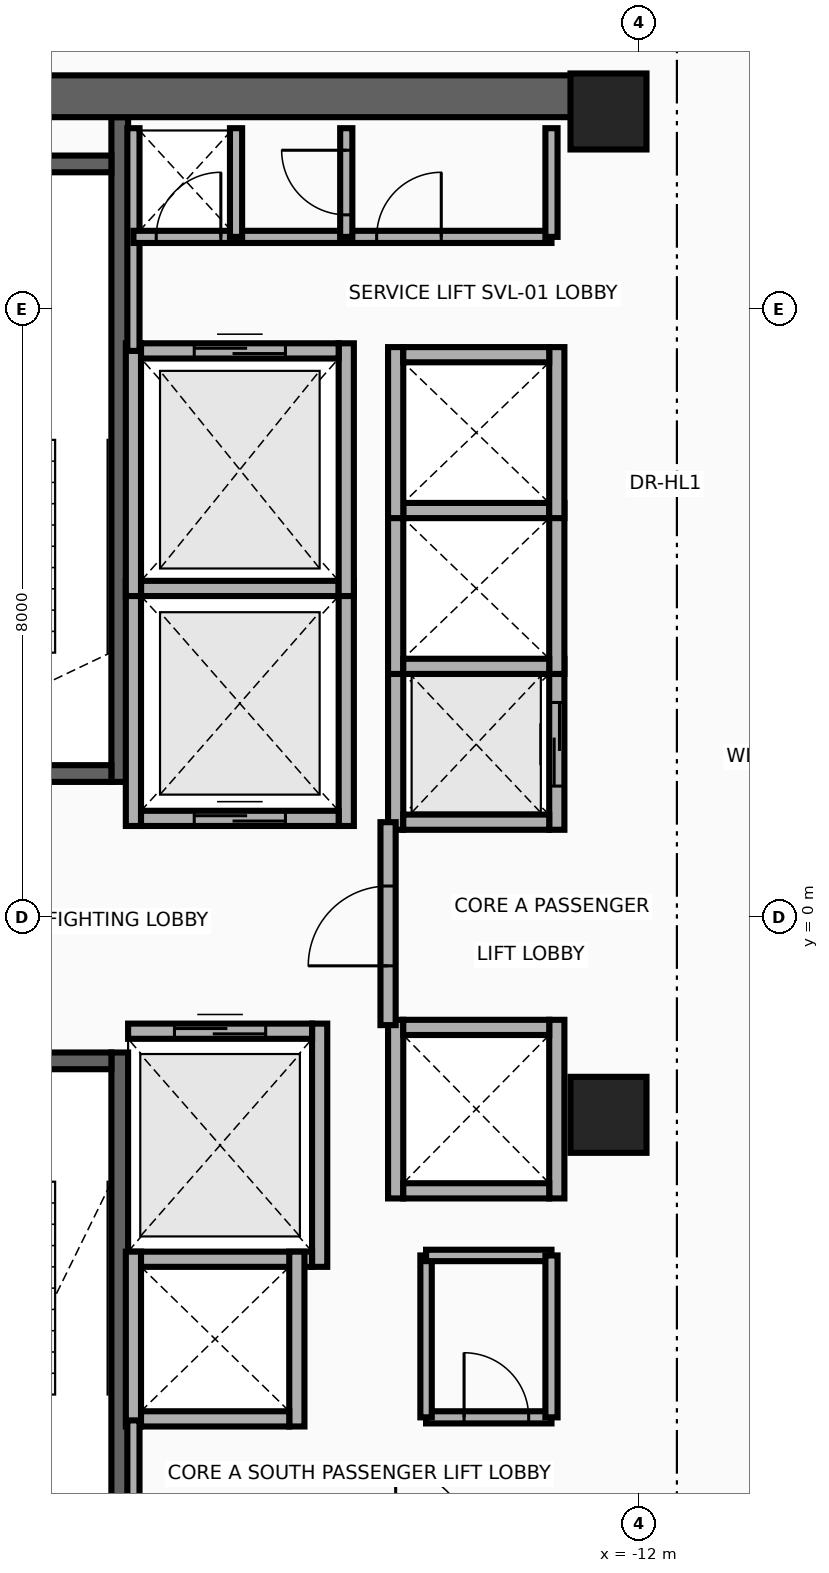
"""IFC4 building model, lengths in metres.
Left out: names, types, materials, properties, quantities, classifications, styles, units other than length and angle.
Written with IfcOpenShell. Run it as: python <this file> out.ifc"""

import sys

from ifc_helpers import new_model, si_unit, direction, frame, frame_2d, origin, origin_2d, place, context, subcontext, project, spatial, rectangle, extrude, source, transform, mapped, element, fill, save


model = new_model("IFC4")
c1 = context("Model", 3, precision=1e-05, world=origin(), true_north=direction((0.0, 1.0)))
c2 = subcontext(c1, "Body", "Model", "MODEL_VIEW")
j1 = project(units=[si_unit("LENGTHUNIT", "METRE"), si_unit("PLANEANGLEUNIT", "RADIAN")], contexts=[c1])
p1 = place(None, origin())
s1 = spatial("IfcSite", under=j1, at=p1, CompositionType="ELEMENT")
p2 = place(p1, origin())
s2 = spatial("IfcBuilding", under=s1, at=p2, CompositionType="ELEMENT")
p3 = place(p2, frame((0.0, 0.0, 180.5)))
s3 = spatial("IfcBuildingStorey", under=s2, at=p3, CompositionType="ELEMENT", Elevation=180.5)
p4 = place(p3, frame((-18.83, 1.78, 0.0), z_axis=(0.0, 0.0, 1.0), x_axis=(0.0, 1.0, 0.0)))
e1 = element("IfcWall", 1, at=p4, inside=s3, PredefinedType="SHEAR", context=c2, shape_type="SweptSolid", body=[
    extrude(rectangle(XDim=8.745, YDim=0.22, at=frame_2d((4.373, 0.0))), origin(), (0.0, 0.0, 1.0), 3.63),
])
p5 = place(p3, frame((-22.05, 1.89, 0.0), z_axis=(0.0, 0.0, 1.0), x_axis=(1.0, 0.0, 0.0)))
e2 = element("IfcWall", 2, at=p5, inside=s3, PredefinedType="SHEAR", context=c2, shape_type="SweptSolid", body=[
    extrude(rectangle(XDim=3.11, YDim=0.22, at=frame_2d((1.555, 0.0))), origin(), (0.0, 0.0, 1.0), 3.63),
])
p6 = place(p5, frame((1.0, 0.0, 0.0)))
e3 = element("IfcOpeningElement", 3, at=p6, cuts=e2, PredefinedType="OPENING", context=c2, shape_type="SweptSolid", body=[
    extrude(rectangle(XDim=1.1, YDim=2.15, at=frame_2d((0.55, 1.075))), frame((0.0, 0.125, 0.0), z_axis=(0.0, -1.0, 0.0), x_axis=(1.0, 0.0, 0.0)), (0.0, 0.0, 1.0), 0.25),
])
p7 = place(p3, frame((-22.05, 9.91, 0.0), z_axis=(0.0, 0.0, 1.0), x_axis=(1.0, 0.0, 0.0)))
e4 = element("IfcWall", 4, at=p7, inside=s3, PredefinedType="SHEAR", context=c2, shape_type="SweptSolid", body=[
    extrude(rectangle(XDim=3.11, YDim=0.22, at=frame_2d((1.555, 0.0))), origin(), (0.0, 0.0, 1.0), 3.63),
])
p8 = place(p3, frame((-18.83, -10.525, 0.0), z_axis=(0.0, 0.0, 1.0), x_axis=(0.0, 1.0, 0.0)))
e5 = element("IfcWall", 5, at=p8, inside=s3, PredefinedType="SHEAR", context=c2, shape_type="SweptSolid", body=[
    extrude(rectangle(XDim=8.745, YDim=0.22, at=frame_2d((4.373, 0.0))), origin(), (0.0, 0.0, 1.0), 3.63),
])
p9 = place(p3, frame((-22.05, -1.89, 0.0), z_axis=(0.0, 0.0, 1.0), x_axis=(1.0, 0.0, 0.0)))
e6 = element("IfcWall", 6, at=p9, inside=s3, PredefinedType="SHEAR", context=c2, shape_type="SweptSolid", body=[
    extrude(rectangle(XDim=3.11, YDim=0.22, at=frame_2d((1.555, 0.0))), origin(), (0.0, 0.0, 1.0), 3.63),
])
p10 = place(p9, frame((1.0, 0.0, 0.0)))
e7 = element("IfcOpeningElement", 7, at=p10, cuts=e6, PredefinedType="OPENING", context=c2, shape_type="SweptSolid", body=[
    extrude(rectangle(XDim=1.1, YDim=2.15, at=frame_2d((0.55, 1.075))), frame((0.0, 0.125, 0.0), z_axis=(0.0, -1.0, 0.0), x_axis=(1.0, 0.0, 0.0)), (0.0, 0.0, 1.0), 0.25),
])
p11 = place(p3, frame((-22.65, 10.8, 0.0), z_axis=(0.0, 0.0, 1.0), x_axis=(1.0, 0.0, 0.0)))
e8 = element("IfcWall", 8, at=p11, inside=s3, PredefinedType="SHEAR", context=c2, shape_type="SweptSolid", body=[
    extrude(rectangle(XDim=10.25, YDim=0.55, at=frame_2d((5.125, 0.0))), origin(), (0.0, 0.0, 1.0), 3.63),
])
m1 = source(origin(), c2, "Body", "SweptSolid", [
    extrude(rectangle(XDim=1.0, YDim=1.0, at=origin_2d()), origin(), (0.0, 0.0, 1.0), 3.95),
])
for number, where, z_axis, x_axis in (
    (9, (-12.4, -2.6, 0.0), (0.0, 0.0, 1.0), (1.0, 0.0, 0.0)),
    (10, (-12.4, 10.6, 0.0), (0.0, 0.0, 1.0), (1.0, 0.0, 0.0)),
):
    element("IfcColumn", number, at=place(p3, frame(where, z_axis=z_axis, x_axis=x_axis)), inside=s3, PredefinedType="COLUMN", context=c2, shape_type="MappedRepresentation", body=[
        mapped(m1, transform((0.0, 0.0, 0.0), x_axis=(1.0, 0.0, 0.0), y_axis=(0.0, 1.0, 0.0), z_axis=(0.0, 0.0, 1.0), scale=1.0)),
    ])
for number, where, z_axis, x_axis in (
    (11, (-18.65, 1.2, 0.0), (0.0, 0.0, 1.0), (0.0, 1.0, 0.0)),
    (12, (-15.85, 1.2, 0.0), (0.0, 0.0, 1.0), (0.0, 1.0, 0.0)),
):
    element("IfcWall", number, at=place(p3, frame(where, z_axis=z_axis, x_axis=x_axis)), inside=s3, PredefinedType="MOVABLE", context=c2, shape_type="SweptSolid", body=[
        extrude(rectangle(XDim=3.225, YDim=0.2, at=frame_2d((1.613, 0.0))), origin(), (0.0, 0.0, 1.0), 3.63),
    ])
p12 = place(p3, frame((-18.55, 1.3, 0.0), z_axis=(0.0, 0.0, 1.0), x_axis=(1.0, 0.0, 0.0)))
e13 = element("IfcWall", 13, at=p12, inside=s3, PredefinedType="MOVABLE", context=c2, shape_type="SweptSolid", body=[
    extrude(rectangle(XDim=2.6, YDim=0.2, at=frame_2d((1.3, 0.0))), origin(), (0.0, 0.0, 1.0), 3.63),
])
p13 = place(p12, frame((0.7, 0.0, 0.0)))
e14 = element("IfcOpeningElement", 14, at=p13, cuts=e13, PredefinedType="OPENING", context=c2, shape_type="SweptSolid", body=[
    extrude(rectangle(XDim=1.2, YDim=2.1, at=frame_2d((0.6, 1.05))), frame((0.0, 0.115, 0.0), z_axis=(0.0, -1.0, 0.0), x_axis=(1.0, 0.0, 0.0)), (0.0, 0.0, 1.0), 0.23),
])
p14 = place(p3, frame((-18.55, 4.325, 0.0), z_axis=(0.0, 0.0, 1.0), x_axis=(1.0, 0.0, 0.0)))
e15 = element("IfcWall", 15, at=p14, inside=s3, PredefinedType="MOVABLE", context=c2, shape_type="SweptSolid", body=[
    extrude(rectangle(XDim=2.6, YDim=0.2, at=frame_2d((1.3, 0.0))), origin(), (0.0, 0.0, 1.0), 3.63),
])
p15 = place(p3, frame((-16.2, -4.6, 0.0), z_axis=(0.0, 0.0, 1.0), x_axis=(0.0, 1.0, 0.0)))
e16 = element("IfcWall", 16, at=p15, inside=s3, PredefinedType="MOVABLE", context=c2, shape_type="SweptSolid", body=[
    extrude(rectangle(XDim=3.2, YDim=0.2, at=frame_2d((1.6, 0.0))), origin(), (0.0, 0.0, 1.0), 3.63),
])
p16 = place(p3, frame((-18.72, -4.5, 0.0), z_axis=(0.0, 0.0, 1.0), x_axis=(1.0, 0.0, 0.0)))
e17 = element("IfcWall", 17, at=p16, inside=s3, PredefinedType="MOVABLE", context=c2, shape_type="SweptSolid", body=[
    extrude(rectangle(XDim=2.42, YDim=0.2, at=frame_2d((1.21, 0.0))), origin(), (0.0, 0.0, 1.0), 3.63),
])
p17 = place(p3, frame((-18.72, -1.5, 0.0), z_axis=(0.0, 0.0, 1.0), x_axis=(1.0, 0.0, 0.0)))
e18 = element("IfcWall", 18, at=p17, inside=s3, PredefinedType="MOVABLE", context=c2, shape_type="SweptSolid", body=[
    extrude(rectangle(XDim=2.42, YDim=0.2, at=frame_2d((1.21, 0.0))), origin(), (0.0, 0.0, 1.0), 3.63),
])
p18 = place(p17, frame((0.61, 0.0, 0.0)))
e19 = element("IfcOpeningElement", 19, at=p18, cuts=e18, PredefinedType="OPENING", context=c2, shape_type="SweptSolid", body=[
    extrude(rectangle(XDim=1.2, YDim=2.1, at=frame_2d((0.6, 1.05))), frame((0.0, 0.115, 0.0), z_axis=(0.0, -1.0, 0.0), x_axis=(1.0, 0.0, 0.0)), (0.0, 0.0, 1.0), 0.23),
])
for number, where, z_axis, x_axis in (
    (20, (-18.65, 4.225, 0.0), (0.0, 0.0, 1.0), (0.0, 1.0, 0.0)),
    (21, (-15.85, 4.225, 0.0), (0.0, 0.0, 1.0), (0.0, 1.0, 0.0)),
):
    element("IfcWall", number, at=place(p3, frame(where, z_axis=z_axis, x_axis=x_axis)), inside=s3, PredefinedType="MOVABLE", context=c2, shape_type="SweptSolid", body=[
        extrude(rectangle(XDim=3.325, YDim=0.2, at=frame_2d((1.663, 0.0))), origin(), (0.0, 0.0, 1.0), 3.63),
    ])
p19 = place(p3, frame((-18.55, 7.45, 0.0), z_axis=(0.0, 0.0, 1.0), x_axis=(1.0, 0.0, 0.0)))
e22 = element("IfcWall", 22, at=p19, inside=s3, PredefinedType="MOVABLE", context=c2, shape_type="SweptSolid", body=[
    extrude(rectangle(XDim=2.6, YDim=0.2, at=frame_2d((1.3, 0.0))), origin(), (0.0, 0.0, 1.0), 3.63),
])
p20 = place(p19, frame((0.7, 0.0, 0.0)))
e23 = element("IfcOpeningElement", 23, at=p20, cuts=e22, PredefinedType="OPENING", context=c2, shape_type="SweptSolid", body=[
    extrude(rectangle(XDim=1.2, YDim=2.1, at=frame_2d((0.6, 1.05))), frame((0.0, 0.115, 0.0), z_axis=(0.0, -1.0, 0.0), x_axis=(1.0, 0.0, 0.0)), (0.0, 0.0, 1.0), 0.23),
])
p21 = place(p3, frame((-15.2, 1.15, 0.0), z_axis=(0.0, 0.0, 1.0), x_axis=(0.0, 1.0, 0.0)))
e24 = element("IfcWall", 24, at=p21, inside=s3, PredefinedType="MOVABLE", context=c2, shape_type="SweptSolid", body=[
    extrude(rectangle(XDim=2.25, YDim=0.2, at=frame_2d((1.125, 0.0))), origin(), (0.0, 0.0, 1.0), 3.63),
])
p22 = place(p3, frame((-13.08, 1.15, 0.0), z_axis=(0.0, 0.0, 1.0), x_axis=(0.0, 1.0, 0.0)))
e25 = element("IfcWall", 25, at=p22, inside=s3, PredefinedType="MOVABLE", context=c2, shape_type="SweptSolid", body=[
    extrude(rectangle(XDim=2.25, YDim=0.2, at=frame_2d((1.125, 0.0))), origin(), (0.0, 0.0, 1.0), 3.63),
])
p23 = place(p22, frame((0.575, 0.0, 0.0)))
e26 = element("IfcOpeningElement", 26, at=p23, cuts=e25, PredefinedType="OPENING", context=c2, shape_type="SweptSolid", body=[
    extrude(rectangle(XDim=1.1, YDim=2.1, at=frame_2d((0.55, 1.05))), frame((0.0, 0.115, 0.0), z_axis=(0.0, -1.0, 0.0), x_axis=(1.0, 0.0, 0.0)), (0.0, 0.0, 1.0), 0.23),
])
p24 = place(p3, frame((-15.1, 1.25, 0.0), z_axis=(0.0, 0.0, 1.0), x_axis=(1.0, 0.0, 0.0)))
e27 = element("IfcWall", 27, at=p24, inside=s3, PredefinedType="MOVABLE", context=c2, shape_type="SweptSolid", body=[
    extrude(rectangle(XDim=1.92, YDim=0.2, at=frame_2d((0.96, 0.0))), origin(), (0.0, 0.0, 1.0), 3.63),
])
for number, where, z_axis, x_axis in (
    (28, (-15.2, 3.2, 0.0), (0.0, 0.0, 1.0), (0.0, 1.0, 0.0)),
    (29, (-13.08, 3.2, 0.0), (0.0, 0.0, 1.0), (0.0, 1.0, 0.0)),
):
    element("IfcWall", number, at=place(p3, frame(where, z_axis=z_axis, x_axis=x_axis)), inside=s3, PredefinedType="MOVABLE", context=c2, shape_type="SweptSolid", body=[
        extrude(rectangle(XDim=2.25, YDim=0.2, at=frame_2d((1.125, 0.0))), origin(), (0.0, 0.0, 1.0), 3.63),
    ])
for number, where, z_axis, x_axis in (
    (30, (-15.1, 3.3, 0.0), (0.0, 0.0, 1.0), (1.0, 0.0, 0.0)),
    (31, (-15.1, 5.35, 0.0), (0.0, 0.0, 1.0), (1.0, 0.0, 0.0)),
):
    element("IfcWall", number, at=place(p3, frame(where, z_axis=z_axis, x_axis=x_axis)), inside=s3, PredefinedType="MOVABLE", context=c2, shape_type="SweptSolid", body=[
        extrude(rectangle(XDim=1.92, YDim=0.2, at=frame_2d((0.96, 0.0))), origin(), (0.0, 0.0, 1.0), 3.63),
    ])
for number, where, z_axis, x_axis in (
    (32, (-15.2, 5.25, 0.0), (0.0, 0.0, 1.0), (0.0, 1.0, 0.0)),
    (33, (-13.08, 5.25, 0.0), (0.0, 0.0, 1.0), (0.0, 1.0, 0.0)),
):
    element("IfcWall", number, at=place(p3, frame(where, z_axis=z_axis, x_axis=x_axis)), inside=s3, PredefinedType="MOVABLE", context=c2, shape_type="SweptSolid", body=[
        extrude(rectangle(XDim=2.25, YDim=0.2, at=frame_2d((1.125, 0.0))), origin(), (0.0, 0.0, 1.0), 3.63),
    ])
p25 = place(p3, frame((-15.1, 7.4, 0.0), z_axis=(0.0, 0.0, 1.0), x_axis=(1.0, 0.0, 0.0)))
e34 = element("IfcWall", 34, at=p25, inside=s3, PredefinedType="MOVABLE", context=c2, shape_type="SweptSolid", body=[
    extrude(rectangle(XDim=1.92, YDim=0.2, at=frame_2d((0.96, 0.0))), origin(), (0.0, 0.0, 1.0), 3.63),
])
for number, where, z_axis, x_axis in (
    (35, (-18.65, -6.7, 0.0), (0.0, 0.0, 1.0), (0.0, 1.0, 0.0)),
    (36, (-16.5, -6.7, 0.0), (0.0, 0.0, 1.0), (0.0, 1.0, 0.0)),
):
    element("IfcWall", number, at=place(p3, frame(where, z_axis=z_axis, x_axis=x_axis)), inside=s3, PredefinedType="MOVABLE", context=c2, shape_type="SweptSolid", body=[
        extrude(rectangle(XDim=2.3, YDim=0.2, at=frame_2d((1.15, 0.0))), origin(), (0.0, 0.0, 1.0), 3.63),
    ])
p26 = place(p3, frame((-18.55, -6.6, 0.0), z_axis=(0.0, 0.0, 1.0), x_axis=(1.0, 0.0, 0.0)))
e37 = element("IfcWall", 37, at=p26, inside=s3, PredefinedType="MOVABLE", context=c2, shape_type="SweptSolid", body=[
    extrude(rectangle(XDim=1.95, YDim=0.2, at=frame_2d((0.975, 0.0))), origin(), (0.0, 0.0, 1.0), 3.63),
])
for number, where, z_axis, x_axis in (
    (38, (-15.2, -3.7, 0.0), (0.0, 0.0, 1.0), (0.0, 1.0, 0.0)),
    (39, (-13.08, -3.7, 0.0), (0.0, 0.0, 1.0), (0.0, 1.0, 0.0)),
):
    element("IfcWall", number, at=place(p3, frame(where, z_axis=z_axis, x_axis=x_axis)), inside=s3, PredefinedType="MOVABLE", context=c2, shape_type="SweptSolid", body=[
        extrude(rectangle(XDim=2.35, YDim=0.2, at=frame_2d((1.175, 0.0))), origin(), (0.0, 0.0, 1.0), 3.63),
    ])
for number, where, z_axis, x_axis in (
    (40, (-15.1, -3.6, 0.0), (0.0, 0.0, 1.0), (1.0, 0.0, 0.0)),
    (41, (-15.1, -1.45, 0.0), (0.0, 0.0, 1.0), (1.0, 0.0, 0.0)),
):
    element("IfcWall", number, at=place(p3, frame(where, z_axis=z_axis, x_axis=x_axis)), inside=s3, PredefinedType="MOVABLE", context=c2, shape_type="SweptSolid", body=[
        extrude(rectangle(XDim=1.92, YDim=0.2, at=frame_2d((0.96, 0.0))), origin(), (0.0, 0.0, 1.0), 3.63),
    ])
p27 = place(p3, frame((-15.3, -1.42, 0.0), z_axis=(0.0, 0.0, 1.0), x_axis=(0.0, 1.0, 0.0)))
e42 = element("IfcWall", 42, at=p27, inside=s3, PredefinedType="PARTITIONING", context=c2, shape_type="SweptSolid", body=[
    extrude(rectangle(XDim=2.67, YDim=0.2, at=frame_2d((1.335, 0.0))), origin(), (0.0, 0.0, 1.0), 3.63),
])
p28 = place(p27, frame((0.78, 0.0, 0.0)))
e43 = element("IfcOpeningElement", 43, at=p28, cuts=e42, PredefinedType="OPENING", context=c2, shape_type="SweptSolid", body=[
    extrude(rectangle(XDim=1.05, YDim=2.15, at=frame_2d((0.525, 1.075))), frame((0.0, 0.115, 0.0), z_axis=(0.0, -1.0, 0.0), x_axis=(1.0, 0.0, 0.0)), (0.0, 0.0, 1.0), 0.23),
])
p29 = place(p3, frame((-18.65, 7.45, 0.0), z_axis=(0.0, 0.0, 1.0), x_axis=(0.0, 1.0, 0.0)))
e44 = element("IfcWall", 44, at=p29, inside=s3, PredefinedType="PARTITIONING", context=c2, shape_type="SweptSolid", body=[
    extrude(rectangle(XDim=2.93, YDim=0.16, at=frame_2d((1.465, 0.0))), origin(), (0.0, 0.0, 1.0), 3.63),
])
p30 = place(p3, frame((-18.65, -8.18, 0.0), z_axis=(0.0, 0.0, 1.0), x_axis=(0.0, 1.0, 0.0)))
e45 = element("IfcWall", 45, at=p30, inside=s3, PredefinedType="PARTITIONING", context=c2, shape_type="SweptSolid", body=[
    extrude(rectangle(XDim=1.56, YDim=0.16, at=frame_2d((0.78, 0.0))), origin(), (0.0, 0.0, 1.0), 3.63),
])
p31 = place(p3, frame((-18.65, 8.95, 0.0), z_axis=(0.0, 0.0, 1.0), x_axis=(1.0, 0.0, 0.0)))
e46 = element("IfcWall", 46, at=p31, inside=s3, PredefinedType="PARTITIONING", context=c2, shape_type="SweptSolid", body=[
    extrude(rectangle(XDim=5.5, YDim=0.16, at=frame_2d((2.75, 0.0))), origin(), (0.0, 0.0, 1.0), 3.63),
])
p32 = place(p31, frame((0.3, 0.0, 0.0)))
e47 = element("IfcOpeningElement", 47, at=p32, cuts=e46, PredefinedType="OPENING", context=c2, shape_type="SweptSolid", body=[
    extrude(rectangle(XDim=0.85, YDim=2.05, at=frame_2d((0.425, 1.025))), frame((0.0, 0.095, 0.0), z_axis=(0.0, -1.0, 0.0), x_axis=(1.0, 0.0, 0.0)), (0.0, 0.0, 1.0), 0.19),
])
p33 = place(p31, frame((3.2, 0.0, 0.0)))
e48 = element("IfcOpeningElement", 48, at=p33, cuts=e46, PredefinedType="OPENING", context=c2, shape_type="SweptSolid", body=[
    extrude(rectangle(XDim=0.85, YDim=2.05, at=frame_2d((0.425, 1.025))), frame((0.0, 0.095, 0.0), z_axis=(0.0, -1.0, 0.0), x_axis=(1.0, 0.0, 0.0)), (0.0, 0.0, 1.0), 0.19),
])
for number, where, z_axis, x_axis in (
    (49, (-13.15, 8.95, 0.0), (0.0, 0.0, 1.0), (0.0, 1.0, 0.0)),
    (50, (-17.3, 8.95, 0.0), (0.0, 0.0, 1.0), (0.0, 1.0, 0.0)),
):
    element("IfcWall", number, at=place(p3, frame(where, z_axis=z_axis, x_axis=x_axis)), inside=s3, PredefinedType="PARTITIONING", context=c2, shape_type="SweptSolid", body=[
        extrude(rectangle(XDim=1.43, YDim=0.16, at=frame_2d((0.715, 0.0))), origin(), (0.0, 0.0, 1.0), 3.63),
    ])
p34 = place(p3, frame((-15.85, 8.95, 0.0), z_axis=(0.0, 0.0, 1.0), x_axis=(0.0, 1.0, 0.0)))
e51 = element("IfcWall", 51, at=p34, inside=s3, PredefinedType="PARTITIONING", context=c2, shape_type="SweptSolid", body=[
    extrude(rectangle(XDim=1.43, YDim=0.16, at=frame_2d((0.715, 0.0))), origin(), (0.0, 0.0, 1.0), 3.63),
])
p35 = place(p34, frame((0.29, 0.0, 0.0)))
e52 = element("IfcOpeningElement", 52, at=p35, cuts=e51, PredefinedType="OPENING", context=c2, shape_type="SweptSolid", body=[
    extrude(rectangle(XDim=0.85, YDim=2.05, at=frame_2d((0.425, 1.025))), frame((0.0, 0.095, 0.0), z_axis=(0.0, -1.0, 0.0), x_axis=(1.0, 0.0, 0.0)), (0.0, 0.0, 1.0), 0.19),
])
p36 = place(p3, frame((-14.8, -6.58, 0.0), z_axis=(0.0, 0.0, 1.0), x_axis=(1.0, 0.0, 0.0)))
e53 = element("IfcWall", 53, at=p36, inside=s3, PredefinedType="PARTITIONING", context=c2, shape_type="SweptSolid", body=[
    extrude(rectangle(XDim=1.65, YDim=0.16, at=frame_2d((0.825, 0.0))), origin(), (0.0, 0.0, 1.0), 3.63),
])
p37 = place(p36, frame((0.5, 0.0, 0.0)))
e54 = element("IfcOpeningElement", 54, at=p37, cuts=e53, PredefinedType="OPENING", context=c2, shape_type="SweptSolid", body=[
    extrude(rectangle(XDim=0.85, YDim=2.05, at=frame_2d((0.425, 1.025))), frame((0.0, 0.095, 0.0), z_axis=(0.0, -1.0, 0.0), x_axis=(1.0, 0.0, 0.0)), (0.0, 0.0, 1.0), 0.19),
])
p38 = place(p3, frame((-14.8, -6.58, 0.0), z_axis=(0.0, 0.0, 1.0), x_axis=(0.0, 1.0, 0.0)))
e55 = element("IfcWall", 55, at=p38, inside=s3, PredefinedType="PARTITIONING", context=c2, shape_type="SweptSolid", body=[
    extrude(rectangle(XDim=2.13, YDim=0.15, at=frame_2d((1.065, 0.0))), origin(), (0.0, 0.0, 1.0), 3.63),
])
p39 = place(p3, frame((-14.8, -4.45, 0.0), z_axis=(0.0, 0.0, 1.0), x_axis=(1.0, 0.0, 0.0)))
e56 = element("IfcWall", 56, at=p39, inside=s3, PredefinedType="PARTITIONING", context=c2, shape_type="SweptSolid", body=[
    extrude(rectangle(XDim=1.65, YDim=0.15, at=frame_2d((0.825, 0.0))), origin(), (0.0, 0.0, 1.0), 3.63),
])
p40 = place(p3, frame((-13.15, -6.58, 0.0), z_axis=(0.0, 0.0, 1.0), x_axis=(0.0, 1.0, 0.0)))
e57 = element("IfcWall", 57, at=p40, inside=s3, PredefinedType="PARTITIONING", context=c2, shape_type="SweptSolid", body=[
    extrude(rectangle(XDim=2.13, YDim=0.16, at=frame_2d((1.065, 0.0))), origin(), (0.0, 0.0, 1.0), 3.63),
])
p41 = place(p13, origin())
e58 = element("IfcDoor", 58, at=p41, inside=s3, OperationType="DOUBLE_DOOR_SLIDING", PredefinedType="DOOR", context=c2, shape_type="SweptSolid", body=[
    extrude(rectangle(XDim=1.2, YDim=2.1, at=frame_2d((0.6, 1.05))), frame((0.0, 0.025, 0.0), z_axis=(0.0, -1.0, 0.0), x_axis=(1.0, 0.0, 0.0)), (0.0, 0.0, 1.0), 0.05),
])
fill(e14, e58)
p42 = place(p18, origin())
e59 = element("IfcDoor", 59, at=p42, inside=s3, OperationType="DOUBLE_DOOR_SLIDING", PredefinedType="DOOR", context=c2, shape_type="SweptSolid", body=[
    extrude(rectangle(XDim=1.2, YDim=2.1, at=frame_2d((0.6, 1.05))), frame((0.0, 0.025, 0.0), z_axis=(0.0, -1.0, 0.0), x_axis=(1.0, 0.0, 0.0)), (0.0, 0.0, 1.0), 0.05),
])
fill(e19, e59)
p43 = place(p20, origin())
e60 = element("IfcDoor", 60, at=p43, inside=s3, OperationType="DOUBLE_DOOR_SLIDING", PredefinedType="DOOR", context=c2, shape_type="SweptSolid", body=[
    extrude(rectangle(XDim=1.2, YDim=2.1, at=frame_2d((0.6, 1.05))), frame((0.0, 0.025, 0.0), z_axis=(0.0, -1.0, 0.0), x_axis=(1.0, 0.0, 0.0)), (0.0, 0.0, 1.0), 0.05),
])
fill(e23, e60)
p44 = place(p23, origin())
e61 = element("IfcDoor", 61, at=p44, inside=s3, OperationType="DOUBLE_DOOR_SLIDING", PredefinedType="DOOR", context=c2, shape_type="SweptSolid", body=[
    extrude(rectangle(XDim=1.1, YDim=2.1, at=frame_2d((0.55, 1.05))), frame((0.0, 0.025, 0.0), z_axis=(0.0, -1.0, 0.0), x_axis=(1.0, 0.0, 0.0)), (0.0, 0.0, 1.0), 0.05),
])
fill(e26, e61)
p45 = place(p28, origin())
e62 = element("IfcDoor", 62, at=p45, inside=s3, OperationType="SINGLE_SWING_RIGHT", PredefinedType="DOOR", context=c2, shape_type="SweptSolid", body=[
    extrude(rectangle(XDim=1.05, YDim=2.15, at=frame_2d((0.525, 1.075))), frame((0.0, 0.025, 0.0), z_axis=(0.0, -1.0, 0.0), x_axis=(1.0, 0.0, 0.0)), (0.0, 0.0, 1.0), 0.05),
])
fill(e43, e62)
p46 = place(p32, origin())
e63 = element("IfcDoor", 63, at=p46, inside=s3, OperationType="SINGLE_SWING_LEFT", PredefinedType="DOOR", context=c2, shape_type="SweptSolid", body=[
    extrude(rectangle(XDim=0.85, YDim=2.05, at=frame_2d((0.425, 1.025))), frame((0.0, 0.025, 0.0), z_axis=(0.0, -1.0, 0.0), x_axis=(1.0, 0.0, 0.0)), (0.0, 0.0, 1.0), 0.05),
])
fill(e47, e63)
p47 = place(p33, origin())
e64 = element("IfcDoor", 64, at=p47, inside=s3, OperationType="SINGLE_SWING_RIGHT", PredefinedType="DOOR", context=c2, shape_type="SweptSolid", body=[
    extrude(rectangle(XDim=0.85, YDim=2.05, at=frame_2d((0.425, 1.025))), frame((0.0, 0.025, 0.0), z_axis=(0.0, -1.0, 0.0), x_axis=(1.0, 0.0, 0.0)), (0.0, 0.0, 1.0), 0.05),
])
fill(e48, e64)
p48 = place(p35, origin())
e65 = element("IfcDoor", 65, at=p48, inside=s3, OperationType="SINGLE_SWING_LEFT", PredefinedType="DOOR", context=c2, shape_type="SweptSolid", body=[
    extrude(rectangle(XDim=0.85, YDim=2.05, at=frame_2d((0.425, 1.025))), frame((0.0, 0.025, 0.0), z_axis=(0.0, -1.0, 0.0), x_axis=(1.0, 0.0, 0.0)), (0.0, 0.0, 1.0), 0.05),
])
fill(e52, e65)
p49 = place(p37, origin())
e66 = element("IfcDoor", 66, at=p49, inside=s3, OperationType="SINGLE_SWING_LEFT", PredefinedType="DOOR", context=c2, shape_type="SweptSolid", body=[
    extrude(rectangle(XDim=0.85, YDim=2.05, at=frame_2d((0.425, 1.025))), frame((0.0, 0.025, 0.0), z_axis=(0.0, -1.0, 0.0), x_axis=(1.0, 0.0, 0.0)), (0.0, 0.0, 1.0), 0.05),
])
fill(e54, e66)
save(model, sys.argv[1])
